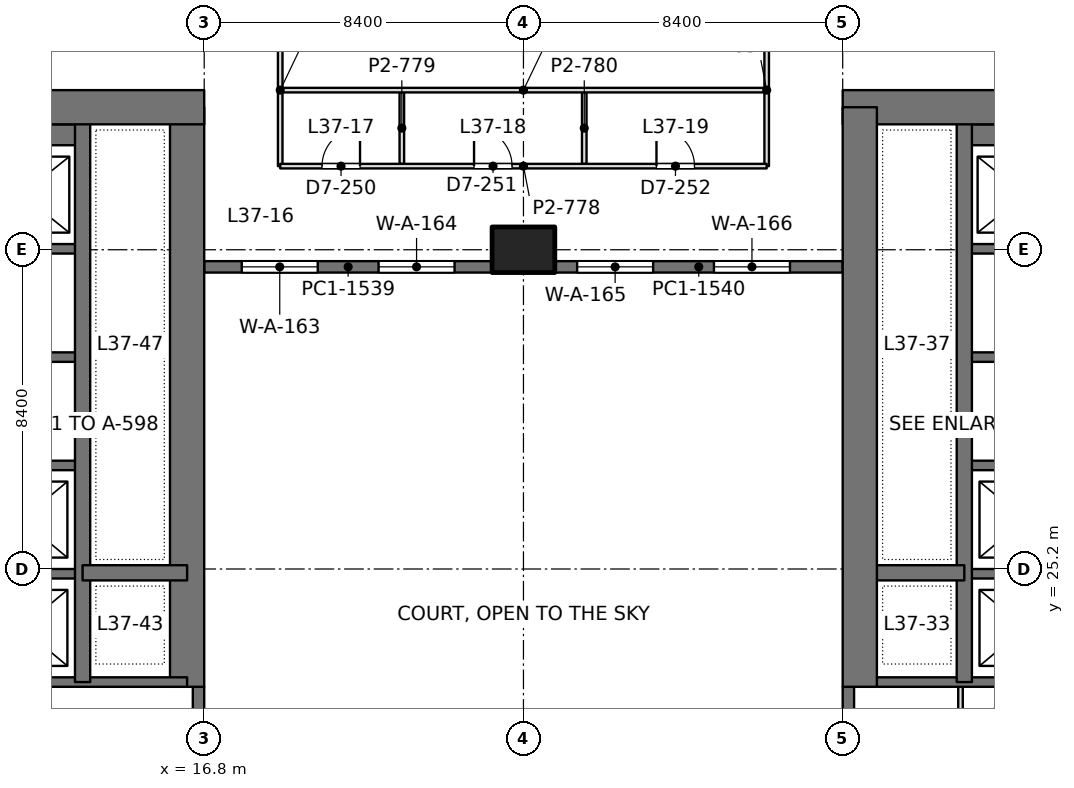
"""IFC4 building model, lengths in metres.
Left out: names, types, materials, properties, quantities, classifications, styles, units other than length and angle.
Written with IfcOpenShell. Run it as: python <this file> out.ifc"""

import sys

from ifc_helpers import new_model, si_unit, direction, frame, frame_2d, origin, origin_2d, place, context, subcontext, project, spatial, rectangle, extrude, element, fill, save


model = new_model("IFC4")
c1 = context("Model", 3, precision=1e-05, world=origin(), true_north=direction((0.0, 1.0)))
c2 = subcontext(c1, "Body", "Model", "MODEL_VIEW")
j1 = project(units=[si_unit("LENGTHUNIT", "METRE"), si_unit("PLANEANGLEUNIT", "RADIAN")], contexts=[c1])
p1 = place(None, origin())
s1 = spatial("IfcSite", under=j1, at=p1, CompositionType="ELEMENT")
p2 = place(p1, origin())
s2 = spatial("IfcBuilding", under=s1, at=p2, CompositionType="ELEMENT")
p3 = place(p2, frame((0.0, 0.0, 163.8)))
s3 = spatial("IfcBuildingStorey", under=s2, at=p3, CompositionType="ELEMENT", Elevation=163.8)
p4 = place(p3, frame((25.2, 33.6, 0.0), z_axis=(0.0, 0.0, 1.0), x_axis=(1.0, 0.0, 0.0)))
e1 = element("IfcColumn", 1, at=p4, inside=s3, PredefinedType="COLUMN", context=c2, shape_type="SweptSolid", body=[
    extrude(rectangle(XDim=1.65, YDim=1.2, at=origin_2d()), origin(), (0.0, 0.0, 1.0), 4.2),
])
p5 = place(p3, frame((-1.2, 37.35, 0.0), z_axis=(0.0, 0.0, 1.0), x_axis=(1.0, 0.0, 0.0)))
e2 = element("IfcWall", 2, at=p5, inside=s3, PredefinedType="SHEAR", context=c2, shape_type="SweptSolid", body=[
    extrude(rectangle(XDim=18.0, YDim=0.9, at=frame_2d((9.0, 0.0))), origin(), (0.0, 0.0, 1.0), 4.2),
])
p6 = place(p5, frame((8.95, 0.0, 0.0)))
e3 = element("IfcOpeningElement", 3, at=p6, cuts=e2, PredefinedType="OPENING", context=c2, shape_type="SweptSolid", body=[
    extrude(rectangle(XDim=1.8, YDim=2.4, at=frame_2d((0.9, 1.2))), frame((0.0, 0.46, 0.0), z_axis=(0.0, -1.0, 0.0), x_axis=(1.0, 0.0, 0.0)), (0.0, 0.0, 1.0), 0.92),
])
p7 = place(p3, frame((16.35, 22.1, 0.0), z_axis=(0.0, 0.0, 1.0), x_axis=(0.0, 1.0, 0.0)))
e4 = element("IfcWall", 4, at=p7, inside=s3, PredefinedType="SHEAR", context=c2, shape_type="SweptSolid", body=[
    extrude(rectangle(XDim=15.25, YDim=0.9, at=frame_2d((7.625, 0.0))), origin(), (0.0, 0.0, 1.0), 4.2),
])
p8 = place(p3, frame((13.6, 22.225, 0.0), z_axis=(0.0, 0.0, 1.0), x_axis=(0.0, 1.0, 0.0)))
e5 = element("IfcWall", 5, at=p8, inside=s3, PredefinedType="SHEAR", context=c2, shape_type="SweptSolid", body=[
    extrude(rectangle(XDim=15.125, YDim=0.4, at=frame_2d((7.562, 0.0))), origin(), (0.0, 0.0, 1.0), 4.2),
])
p9 = place(p3, frame((13.6, 25.1, 0.0), z_axis=(0.0, 0.0, 1.0), x_axis=(1.0, 0.0, 0.0)))
e6 = element("IfcWall", 6, at=p9, inside=s3, PredefinedType="SHEAR", context=c2, shape_type="SweptSolid", body=[
    extrude(rectangle(XDim=2.75, YDim=0.4, at=frame_2d((1.375, 0.0))), origin(), (0.0, 0.0, 1.0), 4.2),
])
p10 = place(p3, frame((10.4, 22.225, 0.0), z_axis=(0.0, 0.0, 1.0), x_axis=(1.0, 0.0, 0.0)))
e7 = element("IfcWall", 7, at=p10, inside=s3, PredefinedType="SHEAR", context=c2, shape_type="SweptSolid", body=[
    extrude(rectangle(XDim=5.95, YDim=0.25, at=frame_2d((2.975, 0.0))), origin(), (0.0, 0.0, 1.0), 4.2),
])
for number, where, z_axis, x_axis in (
    (8, (10.4, 25.075, 0.0), (0.0, 0.0, 1.0), (1.0, 0.0, 0.0)),
    (9, (10.4, 27.925, 0.0), (0.0, 0.0, 1.0), (1.0, 0.0, 0.0)),
    (10, (10.4, 30.775, 0.0), (0.0, 0.0, 1.0), (1.0, 0.0, 0.0)),
    (11, (10.4, 33.625, 0.0), (0.0, 0.0, 1.0), (1.0, 0.0, 0.0)),
):
    element("IfcWall", number, at=place(p3, frame(where, z_axis=z_axis, x_axis=x_axis)), inside=s3, PredefinedType="SHEAR", context=c2, shape_type="SweptSolid", body=[
        extrude(rectangle(XDim=3.2, YDim=0.25, at=frame_2d((1.6, 0.0))), origin(), (0.0, 0.0, 1.0), 4.2),
    ])
p11 = place(p3, frame((10.4, 36.625, 0.0), z_axis=(0.0, 0.0, 1.0), x_axis=(1.0, 0.0, 0.0)))
e12 = element("IfcWall", 12, at=p11, inside=s3, PredefinedType="SHEAR", context=c2, shape_type="SweptSolid", body=[
    extrude(rectangle(XDim=3.2, YDim=0.55, at=frame_2d((1.6, 0.0))), origin(), (0.0, 0.0, 1.0), 4.2),
])
p12 = place(p3, frame((33.6, 37.35, 0.0), z_axis=(0.0, 0.0, 1.0), x_axis=(1.0, 0.0, 0.0)))
e13 = element("IfcWall", 13, at=p12, inside=s3, PredefinedType="SHEAR", context=c2, shape_type="SweptSolid", body=[
    extrude(rectangle(XDim=18.0, YDim=0.9, at=frame_2d((9.0, 0.0))), origin(), (0.0, 0.0, 1.0), 4.2),
])
p13 = place(p12, frame((7.25, 0.0, 0.0)))
e14 = element("IfcOpeningElement", 14, at=p13, cuts=e13, PredefinedType="OPENING", context=c2, shape_type="SweptSolid", body=[
    extrude(rectangle(XDim=1.8, YDim=2.4, at=frame_2d((0.9, 1.2))), frame((0.0, 0.46, 0.0), z_axis=(0.0, -1.0, 0.0), x_axis=(1.0, 0.0, 0.0)), (0.0, 0.0, 1.0), 0.92),
])
p14 = place(p3, frame((34.05, 22.1, 0.0), z_axis=(0.0, 0.0, 1.0), x_axis=(0.0, 1.0, 0.0)))
e15 = element("IfcWall", 15, at=p14, inside=s3, PredefinedType="SHEAR", context=c2, shape_type="SweptSolid", body=[
    extrude(rectangle(XDim=15.25, YDim=0.9, at=frame_2d((7.625, 0.0))), origin(), (0.0, 0.0, 1.0), 4.2),
])
p15 = place(p3, frame((36.8, 22.225, 0.0), z_axis=(0.0, 0.0, 1.0), x_axis=(0.0, 1.0, 0.0)))
e16 = element("IfcWall", 16, at=p15, inside=s3, PredefinedType="SHEAR", context=c2, shape_type="SweptSolid", body=[
    extrude(rectangle(XDim=15.125, YDim=0.4, at=frame_2d((7.562, 0.0))), origin(), (0.0, 0.0, 1.0), 4.2),
])
p16 = place(p3, frame((36.8, 25.1, 0.0), z_axis=(0.0, 0.0, 1.0), x_axis=(-1.0, 0.0, 0.0)))
e17 = element("IfcWall", 17, at=p16, inside=s3, PredefinedType="SHEAR", context=c2, shape_type="SweptSolid", body=[
    extrude(rectangle(XDim=2.75, YDim=0.4, at=frame_2d((1.375, 0.0))), origin(), (0.0, 0.0, 1.0), 4.2),
])
p17 = place(p3, frame((40.0, 22.225, 0.0), z_axis=(0.0, 0.0, 1.0), x_axis=(-1.0, 0.0, 0.0)))
e18 = element("IfcWall", 18, at=p17, inside=s3, PredefinedType="SHEAR", context=c2, shape_type="SweptSolid", body=[
    extrude(rectangle(XDim=5.95, YDim=0.25, at=frame_2d((2.975, 0.0))), origin(), (0.0, 0.0, 1.0), 4.2),
])
for number, where, z_axis, x_axis in (
    (19, (40.0, 25.075, 0.0), (0.0, 0.0, 1.0), (-1.0, 0.0, 0.0)),
    (20, (40.0, 27.925, 0.0), (0.0, 0.0, 1.0), (-1.0, 0.0, 0.0)),
    (21, (40.0, 30.775, 0.0), (0.0, 0.0, 1.0), (-1.0, 0.0, 0.0)),
    (22, (40.0, 33.625, 0.0), (0.0, 0.0, 1.0), (-1.0, 0.0, 0.0)),
):
    element("IfcWall", number, at=place(p3, frame(where, z_axis=z_axis, x_axis=x_axis)), inside=s3, PredefinedType="SHEAR", context=c2, shape_type="SweptSolid", body=[
        extrude(rectangle(XDim=3.2, YDim=0.25, at=frame_2d((1.6, 0.0))), origin(), (0.0, 0.0, 1.0), 4.2),
    ])
p18 = place(p3, frame((40.0, 36.625, 0.0), z_axis=(0.0, 0.0, 1.0), x_axis=(-1.0, 0.0, 0.0)))
e23 = element("IfcWall", 23, at=p18, inside=s3, PredefinedType="SHEAR", context=c2, shape_type="SweptSolid", body=[
    extrude(rectangle(XDim=3.2, YDim=0.55, at=frame_2d((1.6, 0.0))), origin(), (0.0, 0.0, 1.0), 4.2),
])
p19 = place(p3, frame((16.65, 17.1, 0.0), z_axis=(0.0, 0.0, 1.0), x_axis=(0.0, 1.0, 0.0)))
e24 = element("IfcWall", 24, at=p19, inside=s3, PredefinedType="SOLIDWALL", context=c2, shape_type="SweptSolid", body=[
    extrude(rectangle(XDim=5.0, YDim=0.3, at=frame_2d((2.5, 0.0))), origin(), (0.0, 0.0, 1.0), 4.0),
])
p20 = place(p19, frame((1.3, 0.0, 0.1)))
e25 = element("IfcOpeningElement", 25, at=p20, cuts=e24, PredefinedType="OPENING", context=c2, shape_type="SweptSolid", body=[
    extrude(rectangle(XDim=2.0, YDim=3.0, at=frame_2d((1.0, 1.5))), frame((0.0, 0.16, 0.0), z_axis=(0.0, -1.0, 0.0), x_axis=(1.0, 0.0, 0.0)), (0.0, 0.0, 1.0), 0.32),
])
p21 = place(p3, frame((33.75, 17.1, 0.0), z_axis=(0.0, 0.0, 1.0), x_axis=(0.0, 1.0, 0.0)))
e26 = element("IfcWall", 26, at=p21, inside=s3, PredefinedType="SOLIDWALL", context=c2, shape_type="SweptSolid", body=[
    extrude(rectangle(XDim=5.0, YDim=0.3, at=frame_2d((2.5, 0.0))), origin(), (0.0, 0.0, 1.0), 4.0),
])
p22 = place(p21, frame((1.3, 0.0, 0.1)))
e27 = element("IfcOpeningElement", 27, at=p22, cuts=e26, PredefinedType="OPENING", context=c2, shape_type="SweptSolid", body=[
    extrude(rectangle(XDim=2.0, YDim=3.0, at=frame_2d((1.0, 1.5))), frame((0.0, 0.16, 0.0), z_axis=(0.0, -1.0, 0.0), x_axis=(1.0, 0.0, 0.0)), (0.0, 0.0, 1.0), 0.32),
])
p23 = place(p3, frame((16.8, 33.15, 0.0), z_axis=(0.0, 0.0, 1.0), x_axis=(1.0, 0.0, 0.0)))
e28 = element("IfcWall", 28, at=p23, inside=s3, PredefinedType="SOLIDWALL", context=c2, shape_type="SweptSolid", body=[
    extrude(rectangle(XDim=7.575, YDim=0.3, at=frame_2d((3.788, 0.0))), origin(), (0.0, 0.0, 1.0), 4.0),
])
p24 = place(p23, frame((0.988, 0.0, 0.1)))
e29 = element("IfcOpeningElement", 29, at=p24, cuts=e28, PredefinedType="OPENING", context=c2, shape_type="SweptSolid", body=[
    extrude(rectangle(XDim=2.0, YDim=3.0, at=frame_2d((1.0, 1.5))), frame((0.0, 0.16, 0.0), z_axis=(0.0, -1.0, 0.0), x_axis=(1.0, 0.0, 0.0)), (0.0, 0.0, 1.0), 0.32),
])
p25 = place(p23, frame((4.587, 0.0, 0.1)))
e30 = element("IfcOpeningElement", 30, at=p25, cuts=e28, PredefinedType="OPENING", context=c2, shape_type="SweptSolid", body=[
    extrude(rectangle(XDim=2.0, YDim=3.0, at=frame_2d((1.0, 1.5))), frame((0.0, 0.16, 0.0), z_axis=(0.0, -1.0, 0.0), x_axis=(1.0, 0.0, 0.0)), (0.0, 0.0, 1.0), 0.32),
])
p26 = place(p3, frame((26.025, 33.15, 0.0), z_axis=(0.0, 0.0, 1.0), x_axis=(1.0, 0.0, 0.0)))
e31 = element("IfcWall", 31, at=p26, inside=s3, PredefinedType="SOLIDWALL", context=c2, shape_type="SweptSolid", body=[
    extrude(rectangle(XDim=7.575, YDim=0.3, at=frame_2d((3.788, 0.0))), origin(), (0.0, 0.0, 1.0), 4.0),
])
p27 = place(p26, frame((0.587, 0.0, 0.1)))
e32 = element("IfcOpeningElement", 32, at=p27, cuts=e31, PredefinedType="OPENING", context=c2, shape_type="SweptSolid", body=[
    extrude(rectangle(XDim=2.0, YDim=3.0, at=frame_2d((1.0, 1.5))), frame((0.0, 0.16, 0.0), z_axis=(0.0, -1.0, 0.0), x_axis=(1.0, 0.0, 0.0)), (0.0, 0.0, 1.0), 0.32),
])
p28 = place(p26, frame((4.188, 0.0, 0.1)))
e33 = element("IfcOpeningElement", 33, at=p28, cuts=e31, PredefinedType="OPENING", context=c2, shape_type="SweptSolid", body=[
    extrude(rectangle(XDim=2.0, YDim=3.0, at=frame_2d((1.0, 1.5))), frame((0.0, 0.16, 0.0), z_axis=(0.0, -1.0, 0.0), x_axis=(1.0, 0.0, 0.0)), (0.0, 0.0, 1.0), 0.32),
])
p29 = place(p3, frame((36.7, 17.458, 0.0), z_axis=(0.0, 0.0, 1.0), x_axis=(0.0, 1.0, 0.0)))
e34 = element("IfcWall", 34, at=p29, inside=s3, PredefinedType="PARTITIONING", context=c2, shape_type="SweptSolid", body=[
    extrude(rectangle(XDim=4.644, YDim=0.12, at=frame_2d((2.322, 0.0))), origin(), (0.0, 0.0, 1.0), 3.4),
])
for number, where, z_axis, x_axis in (
    (35, (18.8, 35.8, 0.0), (0.0, 0.0, 1.0), (0.0, 1.0, 0.0)),
    (36, (31.6, 35.8, 0.0), (0.0, 0.0, 1.0), (0.0, 1.0, 0.0)),
):
    element("IfcWall", number, at=place(p3, frame(where, z_axis=z_axis, x_axis=x_axis)), inside=s3, PredefinedType="PARTITIONING", context=c2, shape_type="SweptSolid", body=[
        extrude(rectangle(XDim=4.0, YDim=0.12, at=frame_2d((2.0, 0.0))), origin(), (0.0, 0.0, 1.0), 4.0),
    ])
for number, where, z_axis, x_axis in (
    (37, (22.0, 35.858, 0.0), (0.0, 0.0, 1.0), (0.0, 1.0, 0.0)),
    (38, (26.8, 35.858, 0.0), (0.0, 0.0, 1.0), (0.0, 1.0, 0.0)),
):
    element("IfcWall", number, at=place(p3, frame(where, z_axis=z_axis, x_axis=x_axis)), inside=s3, PredefinedType="PARTITIONING", context=c2, shape_type="SweptSolid", body=[
        extrude(rectangle(XDim=1.884, YDim=0.12, at=frame_2d((0.942, 0.0))), origin(), (0.0, 0.0, 1.0), 4.0),
    ])
p30 = place(p3, frame((18.8, 35.8, 0.0), z_axis=(0.0, 0.0, 1.0), x_axis=(1.0, 0.0, 0.0)))
e39 = element("IfcWall", 39, at=p30, inside=s3, PredefinedType="PARTITIONING", context=c2, shape_type="SweptSolid", body=[
    extrude(rectangle(XDim=12.8, YDim=0.12, at=frame_2d((6.4, 0.0))), origin(), (0.0, 0.0, 1.0), 3.3),
])
p31 = place(p30, frame((1.1, 0.0, 0.0)))
e40 = element("IfcOpeningElement", 40, at=p31, cuts=e39, PredefinedType="OPENING", context=c2, shape_type="SweptSolid", body=[
    extrude(rectangle(XDim=1.0, YDim=2.4, at=frame_2d((0.5, 1.2))), frame((0.0, 0.07, 0.0), z_axis=(0.0, -1.0, 0.0), x_axis=(1.0, 0.0, 0.0)), (0.0, 0.0, 1.0), 0.14),
])
p32 = place(p30, frame((5.1, 0.0, 0.0)))
e41 = element("IfcOpeningElement", 41, at=p32, cuts=e39, PredefinedType="OPENING", context=c2, shape_type="SweptSolid", body=[
    extrude(rectangle(XDim=1.0, YDim=2.4, at=frame_2d((0.5, 1.2))), frame((0.0, 0.07, 0.0), z_axis=(0.0, -1.0, 0.0), x_axis=(1.0, 0.0, 0.0)), (0.0, 0.0, 1.0), 0.14),
])
p33 = place(p30, frame((9.9, 0.0, 0.0)))
e42 = element("IfcOpeningElement", 42, at=p33, cuts=e39, PredefinedType="OPENING", context=c2, shape_type="SweptSolid", body=[
    extrude(rectangle(XDim=1.0, YDim=2.4, at=frame_2d((0.5, 1.2))), frame((0.0, 0.07, 0.0), z_axis=(0.0, -1.0, 0.0), x_axis=(1.0, 0.0, 0.0)), (0.0, 0.0, 1.0), 0.14),
])
p34 = place(p3, frame((18.858, 37.8, 0.0), z_axis=(0.0, 0.0, 1.0), x_axis=(1.0, 0.0, 0.0)))
e43 = element("IfcWall", 43, at=p34, inside=s3, PredefinedType="PARTITIONING", context=c2, shape_type="SweptSolid", body=[
    extrude(rectangle(XDim=12.684, YDim=0.12, at=frame_2d((6.342, 0.0))), origin(), (0.0, 0.0, 1.0), 3.3),
])
p35 = place(p24, origin())
e44 = element("IfcWindow", 44, at=p35, inside=s3, PartitioningType="SINGLE_PANEL", PredefinedType="WINDOW", context=c2, shape_type="SweptSolid", body=[
    extrude(rectangle(XDim=2.0, YDim=3.0, at=frame_2d((1.0, 1.5))), frame((0.0, 0.03, 0.0), z_axis=(0.0, -1.0, 0.0), x_axis=(1.0, 0.0, 0.0)), (0.0, 0.0, 1.0), 0.06),
])
fill(e29, e44)
p36 = place(p25, origin())
e45 = element("IfcWindow", 45, at=p36, inside=s3, PartitioningType="SINGLE_PANEL", PredefinedType="WINDOW", context=c2, shape_type="SweptSolid", body=[
    extrude(rectangle(XDim=2.0, YDim=3.0, at=frame_2d((1.0, 1.5))), frame((0.0, 0.03, 0.0), z_axis=(0.0, -1.0, 0.0), x_axis=(1.0, 0.0, 0.0)), (0.0, 0.0, 1.0), 0.06),
])
fill(e30, e45)
p37 = place(p27, origin())
e46 = element("IfcWindow", 46, at=p37, inside=s3, PartitioningType="SINGLE_PANEL", PredefinedType="WINDOW", context=c2, shape_type="SweptSolid", body=[
    extrude(rectangle(XDim=2.0, YDim=3.0, at=frame_2d((1.0, 1.5))), frame((0.0, 0.03, 0.0), z_axis=(0.0, -1.0, 0.0), x_axis=(1.0, 0.0, 0.0)), (0.0, 0.0, 1.0), 0.06),
])
fill(e32, e46)
p38 = place(p28, origin())
e47 = element("IfcWindow", 47, at=p38, inside=s3, PartitioningType="SINGLE_PANEL", PredefinedType="WINDOW", context=c2, shape_type="SweptSolid", body=[
    extrude(rectangle(XDim=2.0, YDim=3.0, at=frame_2d((1.0, 1.5))), frame((0.0, 0.03, 0.0), z_axis=(0.0, -1.0, 0.0), x_axis=(1.0, 0.0, 0.0)), (0.0, 0.0, 1.0), 0.06),
])
fill(e33, e47)
p39 = place(p31, origin())
e48 = element("IfcDoor", 48, at=p39, inside=s3, OperationType="SINGLE_SWING_RIGHT", PredefinedType="DOOR", context=c2, shape_type="SweptSolid", body=[
    extrude(rectangle(XDim=1.0, YDim=2.4, at=frame_2d((0.5, 1.2))), frame((0.0, 0.025, 0.0), z_axis=(0.0, -1.0, 0.0), x_axis=(1.0, 0.0, 0.0)), (0.0, 0.0, 1.0), 0.05),
])
fill(e40, e48)
p40 = place(p32, origin())
e49 = element("IfcDoor", 49, at=p40, inside=s3, OperationType="SINGLE_SWING_LEFT", PredefinedType="DOOR", context=c2, shape_type="SweptSolid", body=[
    extrude(rectangle(XDim=1.0, YDim=2.4, at=frame_2d((0.5, 1.2))), frame((0.0, 0.025, 0.0), z_axis=(0.0, -1.0, 0.0), x_axis=(1.0, 0.0, 0.0)), (0.0, 0.0, 1.0), 0.05),
])
fill(e41, e49)
p41 = place(p33, origin())
e50 = element("IfcDoor", 50, at=p41, inside=s3, OperationType="SINGLE_SWING_LEFT", PredefinedType="DOOR", context=c2, shape_type="SweptSolid", body=[
    extrude(rectangle(XDim=1.0, YDim=2.4, at=frame_2d((0.5, 1.2))), frame((0.0, 0.025, 0.0), z_axis=(0.0, -1.0, 0.0), x_axis=(1.0, 0.0, 0.0)), (0.0, 0.0, 1.0), 0.05),
])
fill(e42, e50)
save(model, sys.argv[1])
